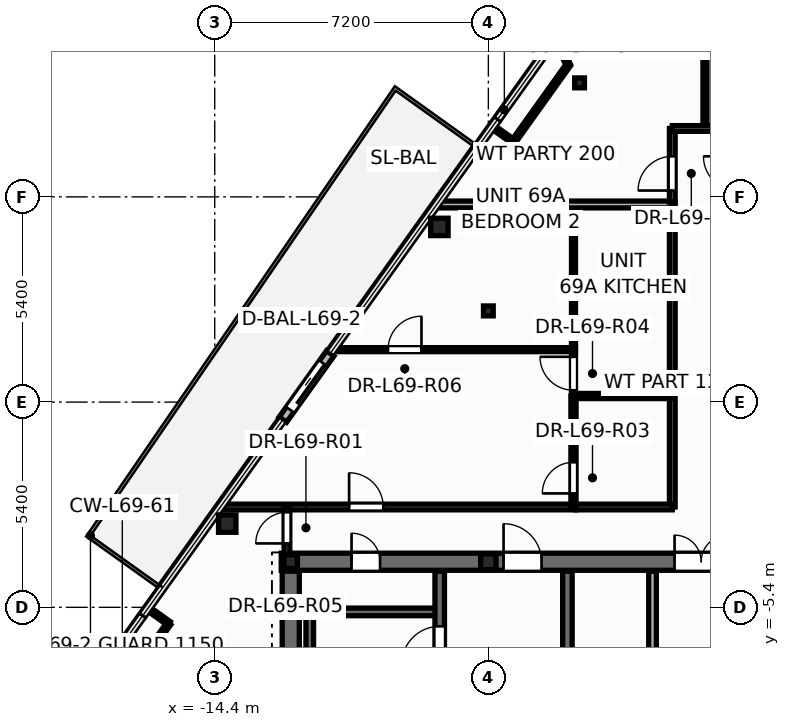
"""IFC4 building model, lengths in metres.
Left out: names, types, materials, properties, quantities, classifications, styles, units other than length and angle.
Written with IfcOpenShell. Run it as: python <this file> out.ifc"""

import sys

from ifc_helpers import new_model, si_unit, direction, frame, frame_2d, origin, origin_2d, place, context, subcontext, project, spatial, rectangle, hollow_circle, i_section, extrude, element, fill, save


model = new_model("IFC4")
c1 = context("Model", 3, precision=1e-05, world=origin(), true_north=direction((0.0, 1.0)))
c2 = subcontext(c1, "Body", "Model", "MODEL_VIEW")
j1 = project(units=[si_unit("LENGTHUNIT", "METRE"), si_unit("PLANEANGLEUNIT", "RADIAN")], contexts=[c1])
p1 = place(None, origin())
s1 = spatial("IfcSite", under=j1, at=p1, CompositionType="ELEMENT")
p2 = place(p1, origin())
s2 = spatial("IfcBuilding", under=s1, at=p2, CompositionType="ELEMENT")
p3 = place(p2, frame((0.0, 0.0, 263.4)))
s3 = spatial("IfcBuildingStorey", under=s2, at=p3, CompositionType="ELEMENT", Elevation=263.4)
for number, where, z_axis, x_axis in (
    (1, (-8.489, 4.61, 0.0), (0.0, 0.0, 1.0), (1.0, 0.0, 0.0)),
    (2, (-14.072, -3.196, 0.0), (0.0, 0.0, 1.0), (1.0, 0.0, 0.0)),
):
    element("IfcColumn", number, at=place(p3, frame(where, z_axis=z_axis, x_axis=x_axis)), inside=s3, PredefinedType="COLUMN", context=c2, shape_type="SweptSolid", body=[
        extrude(hollow_circle(Radius=0.229, WallThickness=0.016, at=origin_2d()), origin(), (0.0, 0.0, 1.0), 3.6),
    ])
p4 = place(p3, frame((-12.4, -4.2, 0.0), z_axis=(0.0, 0.0, 1.0), x_axis=(1.0, 0.0, 0.0)))
e3 = element("IfcColumn", 3, at=p4, inside=s3, PredefinedType="COLUMN", context=c2, shape_type="SweptSolid", body=[
    extrude(i_section(OverallWidth=0.352, OverallDepth=0.359, WebThickness=0.018, FlangeThickness=0.026, at=origin_2d()), origin(), (0.0, 0.0, 1.0), 3.6),
])
p5 = place(p3, frame((-7.2, -4.2, 0.0), z_axis=(0.0, 0.0, 1.0), x_axis=(1.0, 0.0, 0.0)))
e4 = element("IfcColumn", 4, at=p5, inside=s3, PredefinedType="PILASTER", context=c2, shape_type="SweptSolid", body=[
    extrude(i_section(OverallWidth=0.405, OverallDepth=0.414, WebThickness=0.022, FlangeThickness=0.032, at=origin_2d()), origin(), (0.0, 0.0, 1.0), 3.6),
])
for number, where, z_axis, x_axis in (
    (5, (-7.2, 2.4, 0.0), (0.0, 0.0, 1.0), (1.0, 0.0, 0.0)),
    (6, (-4.8, 8.4, 0.0), (0.0, 0.0, 1.0), (1.0, 0.0, 0.0)),
):
    element("IfcColumn", number, at=place(p3, frame(where, z_axis=z_axis, x_axis=x_axis)), inside=s3, PredefinedType="COLUMN", context=c2, shape_type="SweptSolid", body=[
        extrude(i_section(OverallWidth=0.256, OverallDepth=0.26, WebThickness=0.01, FlangeThickness=0.017, at=origin_2d()), origin(), (0.0, 0.0, 1.0), 3.6),
    ])
p6 = place(p3, frame((-11.361, 1.281, -0.015), z_axis=(0.0, 0.0, 1.0), x_axis=(-0.581702133873, -0.813401885569, 0.0)))
e7 = element("IfcWall", 7, at=p6, inside=s3, PredefinedType="STANDARD", context=c2, shape_type="SweptSolid", body=[
    extrude(rectangle(XDim=2.14, YDim=0.24, at=frame_2d((1.07, 0.0))), origin(), (0.0, 0.0, 1.0), 2.878),
])
p7 = place(p6, frame((0.32, 0.0, 0.015)))
e8 = element("IfcOpeningElement", 8, at=p7, cuts=e7, PredefinedType="OPENING", context=c2, shape_type="SweptSolid", body=[
    extrude(rectangle(XDim=1.506, YDim=2.204, at=frame_2d((0.75, 1.102))), frame((0.0, 0.13, 0.0), z_axis=(0.0, -1.0, 0.0), x_axis=(1.0, 0.0, 0.0)), (0.0, 0.0, 1.0), 0.26),
])
p8 = place(p3, frame((-12.65, -4.2, 0.0), z_axis=(0.0, 0.0, 1.0), x_axis=(1.0, 0.0, 0.0)))
e9 = element("IfcWall", 9, at=p8, inside=s3, PredefinedType="SHEAR", context=c2, shape_type="SweptSolid", body=[
    extrude(rectangle(XDim=25.3, YDim=0.45, at=frame_2d((12.65, 0.0))), origin(), (0.0, 0.0, 1.0), 3.6),
])
p9 = place(p8, frame((1.85, 0.0, 0.0)))
e10 = element("IfcOpeningElement", 10, at=p9, cuts=e9, PredefinedType="OPENING", context=c2, shape_type="SweptSolid", body=[
    extrude(rectangle(XDim=0.756, YDim=2.054, at=frame_2d((0.375, 1.027))), frame((0.0, 0.235, 0.0), z_axis=(0.0, -1.0, 0.0), x_axis=(1.0, 0.0, 0.0)), (0.0, 0.0, 1.0), 0.47),
])
p10 = place(p8, frame((22.65, 0.0, 0.0)))
e11 = element("IfcOpeningElement", 11, at=p10, cuts=e9, PredefinedType="OPENING", context=c2, shape_type="SweptSolid", body=[
    extrude(rectangle(XDim=0.756, YDim=2.054, at=frame_2d((0.375, 1.027))), frame((0.0, 0.235, 0.0), z_axis=(0.0, -1.0, 0.0), x_axis=(1.0, 0.0, 0.0)), (0.0, 0.0, 1.0), 0.47),
])
p11 = place(p8, frame((5.85, 0.0, 0.0)))
e12 = element("IfcOpeningElement", 12, at=p11, cuts=e9, PredefinedType="OPENING", context=c2, shape_type="SweptSolid", body=[
    extrude(rectangle(XDim=1.006, YDim=2.104, at=frame_2d((0.5, 1.052))), frame((0.0, 0.235, 0.0), z_axis=(0.0, -1.0, 0.0), x_axis=(1.0, 0.0, 0.0)), (0.0, 0.0, 1.0), 0.47),
])
p12 = place(p8, frame((10.35, 0.0, 0.0)))
e13 = element("IfcOpeningElement", 13, at=p12, cuts=e9, PredefinedType="OPENING", context=c2, shape_type="SweptSolid", body=[
    extrude(rectangle(XDim=1.406, YDim=2.154, at=frame_2d((0.7, 1.077))), frame((0.0, 0.235, 0.0), z_axis=(0.0, -1.0, 0.0), x_axis=(1.0, 0.0, 0.0)), (0.0, 0.0, 1.0), 0.47),
])
p13 = place(p8, frame((18.45, 0.0, 0.0)))
e14 = element("IfcOpeningElement", 14, at=p13, cuts=e9, PredefinedType="OPENING", context=c2, shape_type="SweptSolid", body=[
    extrude(rectangle(XDim=1.006, YDim=2.104, at=frame_2d((0.5, 1.052))), frame((0.0, 0.235, 0.0), z_axis=(0.0, -1.0, 0.0), x_axis=(1.0, 0.0, 0.0)), (0.0, 0.0, 1.0), 0.47),
])
p14 = place(p3, frame((-12.35, -5.52, 0.0), z_axis=(0.0, 0.0, 1.0), x_axis=(1.0, 0.0, 0.0)))
e15 = element("IfcWall", 15, at=p14, inside=s3, PredefinedType="SOLIDWALL", context=c2, shape_type="SweptSolid", body=[
    extrude(rectangle(XDim=3.87, YDim=0.2, at=frame_2d((1.935, 0.0))), origin(), (0.0, 0.0, 1.0), 3.6),
])
p15 = place(p3, frame((-11.9, -13.1, 0.0), z_axis=(0.0, 0.0, 1.0), x_axis=(0.0, 1.0, 0.0)))
e16 = element("IfcWall", 16, at=p15, inside=s3, PredefinedType="SOLIDWALL", context=c2, shape_type="SweptSolid", body=[
    extrude(rectangle(XDim=7.58, YDim=0.2, at=frame_2d((3.79, 0.0))), origin(), (0.0, 0.0, 1.0), 3.6),
])
p16 = place(p3, frame((-8.48, -13.85, 0.0), z_axis=(0.0, 0.0, 1.0), x_axis=(0.0, 1.0, 0.0)))
e17 = element("IfcWall", 17, at=p16, inside=s3, PredefinedType="SHEAR", context=c2, shape_type="SweptSolid", body=[
    extrude(rectangle(XDim=9.4, YDim=0.25, at=frame_2d((4.7, 0.0))), origin(), (0.0, 0.0, 1.0), 3.6),
])
p17 = place(p16, frame((6.95, 0.0, 0.0)))
e18 = element("IfcOpeningElement", 18, at=p17, cuts=e17, PredefinedType="OPENING", context=c2, shape_type="SweptSolid", body=[
    extrude(rectangle(XDim=1.006, YDim=2.104, at=frame_2d((0.5, 1.052))), frame((0.0, 0.135, 0.0), z_axis=(0.0, -1.0, 0.0), x_axis=(1.0, 0.0, 0.0)), (0.0, 0.0, 1.0), 0.27),
])
p18 = place(p3, frame((-5.12, -13.85, 0.0), z_axis=(0.0, 0.0, 1.0), x_axis=(0.0, 1.0, 0.0)))
e19 = element("IfcWall", 19, at=p18, inside=s3, PredefinedType="SHEAR", context=c2, shape_type="SweptSolid", body=[
    extrude(rectangle(XDim=9.4, YDim=0.25, at=frame_2d((4.7, 0.0))), origin(), (0.0, 0.0, 1.0), 3.6),
])
p19 = place(p3, frame((-12.4, -13.85, 0.0), z_axis=(0.0, 0.0, 1.0), x_axis=(0.0, 1.0, 0.0)))
e20 = element("IfcWall", 20, at=p19, inside=s3, PredefinedType="SHEAR", context=c2, shape_type="SweptSolid", body=[
    extrude(rectangle(XDim=9.4, YDim=0.45, at=frame_2d((4.7, 0.0))), origin(), (0.0, 0.0, 1.0), 3.6),
])
p20 = place(p3, frame((-2.88, -9.45, 0.0), z_axis=(0.0, 0.0, 1.0), x_axis=(0.0, 1.0, 0.0)))
e21 = element("IfcWall", 21, at=p20, inside=s3, PredefinedType="SOLIDWALL", context=c2, shape_type="SweptSolid", body=[
    extrude(rectangle(XDim=5.0, YDim=0.2, at=frame_2d((2.5, 0.0))), origin(), (0.0, 0.0, 1.0), 3.345),
])
p21 = place(p20, frame((2.05, 0.0, 0.0)))
e22 = element("IfcOpeningElement", 22, at=p21, cuts=e21, PredefinedType="OPENING", context=c2, shape_type="SweptSolid", body=[
    extrude(rectangle(XDim=0.926, YDim=2.104, at=frame_2d((0.46, 1.052))), frame((0.0, 0.11, 0.0), z_axis=(0.0, -1.0, 0.0), x_axis=(1.0, 0.0, 0.0)), (0.0, 0.0, 1.0), 0.22),
])
p22 = place(p3, frame((-14.251, -2.76, 0.0), z_axis=(0.0, 0.0, 1.0), x_axis=(1.0, 0.0, 0.0)))
e23 = element("IfcWall", 23, at=p22, inside=s3, PredefinedType="PARTITIONING", context=c2, shape_type="SweptSolid", body=[
    extrude(rectangle(XDim=9.351, YDim=0.15, at=frame_2d((4.676, 0.0))), origin(), (0.0, 0.0, 1.0), 2.32),
])
p23 = place(p22, frame((3.386, 0.0, 0.0)))
e24 = element("IfcOpeningElement", 24, at=p23, cuts=e23, PredefinedType="OPENING", context=c2, shape_type="SweptSolid", body=[
    extrude(rectangle(XDim=0.906, YDim=2.104, at=frame_2d((0.45, 1.052))), frame((0.0, 0.085, 0.0), z_axis=(0.0, -1.0, 0.0), x_axis=(1.0, 0.0, 0.0)), (0.0, 0.0, 1.0), 0.17),
])
p24 = place(p3, frame((-1.5, 7.2, 0.0), z_axis=(0.0, 0.0, 1.0), x_axis=(0.0, 1.0, 0.0)))
e25 = element("IfcWall", 25, at=p24, inside=s3, PredefinedType="PARTITIONING", context=c2, shape_type="SweptSolid", body=[
    extrude(rectangle(XDim=6.917, YDim=0.105, at=frame_2d((3.458, 0.0))), origin(), (0.0, 0.0, 1.0), 2.718),
])
p25 = place(p3, frame((-11.29, 1.38, 0.0), z_axis=(0.0, 0.0, 1.0), x_axis=(1.0, 0.0, 0.0)))
e26 = element("IfcWall", 26, at=p25, inside=s3, PredefinedType="PARTITIONING", context=c2, shape_type="SweptSolid", body=[
    extrude(rectangle(XDim=6.33, YDim=0.105, at=frame_2d((3.165, 0.0))), origin(), (0.0, 0.0, 1.0), 2.32),
])
p26 = place(p25, frame((1.45, 0.0, 0.0)))
e27 = element("IfcOpeningElement", 27, at=p26, cuts=e26, PredefinedType="OPENING", context=c2, shape_type="SweptSolid", body=[
    extrude(rectangle(XDim=0.886, YDim=2.104, at=frame_2d((0.44, 1.052))), frame((0.0, 0.062, 0.0), z_axis=(0.0, -1.0, 0.0), x_axis=(1.0, 0.0, 0.0)), (0.0, 0.0, 1.0), 0.125),
])
p27 = place(p3, frame((-2.36, -2.76, 0.0), z_axis=(0.0, 0.0, 1.0), x_axis=(0.0, 1.0, 0.0)))
e28 = element("IfcWall", 28, at=p27, inside=s3, PredefinedType="PARTITIONING", context=c2, shape_type="SweptSolid", body=[
    extrude(rectangle(XDim=8.02, YDim=0.15, at=frame_2d((4.01, 0.0))), origin(), (0.0, 0.0, 1.0), 2.32),
])
p28 = place(p3, frame((-4.96, 1.32, 0.0), z_axis=(0.0, 0.0, 1.0), x_axis=(0.0, 1.0, 0.0)))
e29 = element("IfcWall", 29, at=p28, inside=s3, PredefinedType="PARTITIONING", context=c2, shape_type="SweptSolid", body=[
    extrude(rectangle(XDim=3.88, YDim=0.105, at=frame_2d((1.94, 0.0))), origin(), (0.0, 0.0, 1.0), 2.32),
])
p29 = place(p3, frame((-8.558, 5.2, 0.0), z_axis=(0.0, 0.0, 1.0), x_axis=(1.0, 0.0, 0.0)))
e30 = element("IfcWall", 30, at=p29, inside=s3, PredefinedType="PARTITIONING", context=c2, shape_type="SweptSolid", body=[
    extrude(rectangle(XDim=6.198, YDim=0.18, at=frame_2d((3.099, 0.0))), origin(), (0.0, 0.0, 1.0), 2.718),
])
p30 = place(p3, frame((-4.96, -2.76, 0.0), z_axis=(0.0, 0.0, 1.0), x_axis=(0.0, 1.0, 0.0)))
e31 = element("IfcWall", 31, at=p30, inside=s3, PredefinedType="PARTITIONING", context=c2, shape_type="SweptSolid", body=[
    extrude(rectangle(XDim=2.92, YDim=0.135, at=frame_2d((1.46, 0.0))), origin(), (0.0, 0.0, 1.0), 3.345),
])
p31 = place(p30, frame((0.357, 0.0, 0.0)))
e32 = element("IfcOpeningElement", 32, at=p31, cuts=e31, PredefinedType="OPENING", context=c2, shape_type="SweptSolid", body=[
    extrude(rectangle(XDim=0.826, YDim=2.104, at=frame_2d((0.41, 1.052))), frame((0.0, 0.078, 0.0), z_axis=(0.0, -1.0, 0.0), x_axis=(1.0, 0.0, 0.0)), (0.0, 0.0, 1.0), 0.155),
])
p32 = place(p3, frame((-4.898, -2.76, 0.0), z_axis=(0.0, 0.0, 1.0), x_axis=(1.0, 0.0, 0.0)))
e33 = element("IfcWall", 33, at=p32, inside=s3, PredefinedType="PARTITIONING", context=c2, shape_type="SweptSolid", body=[
    extrude(rectangle(XDim=2.538, YDim=0.15, at=frame_2d((1.269, 0.0))), origin(), (0.0, 0.0, 1.0), 2.965),
])
p33 = place(p3, frame((-4.96, 0.16, 0.0), z_axis=(0.0, 0.0, 1.0), x_axis=(1.0, 0.0, 0.0)))
e34 = element("IfcWall", 34, at=p33, inside=s3, PredefinedType="PARTITIONING", context=c2, shape_type="SweptSolid", body=[
    extrude(rectangle(XDim=2.6, YDim=0.135, at=frame_2d((1.3, 0.0))), origin(), (0.0, 0.0, 1.0), 2.965),
])
p34 = place(p3, frame((-5.097, 8.87, 0.0), z_axis=(0.0, 0.0, 1.0), x_axis=(-0.581685079242, -0.813414081872, 0.0)))
e35 = element("IfcWall", 35, at=p34, inside=s3, PredefinedType="PARTITIONING", context=c2, shape_type="SweptSolid", body=[
    extrude(rectangle(XDim=2.48, YDim=0.12, at=frame_2d((1.24, 0.0))), origin(), (0.0, 0.0, 1.0), 2.718),
])
p35 = place(p3, frame((-15.606, -5.824, 0.0), z_axis=(0.0, 0.0, 1.0), x_axis=(-0.581685079242, -0.813414081872, 0.0)))
e36 = element("IfcWall", 36, at=p35, inside=s3, PredefinedType="PARTITIONING", context=c2, shape_type="SweptSolid", body=[
    extrude(rectangle(XDim=2.48, YDim=0.12, at=frame_2d((1.24, 0.0))), origin(), (0.0, 0.0, 1.0), 3.345),
])
p36 = place(p3, frame((-2.36, 5.262, 0.0), z_axis=(0.0, 0.0, 1.0), x_axis=(0.0, 1.0, 0.0)))
e37 = element("IfcWall", 37, at=p36, inside=s3, PredefinedType="PARTITIONING", context=c2, shape_type="SweptSolid", body=[
    extrude(rectangle(XDim=1.938, YDim=0.15, at=frame_2d((0.969, 0.0))), origin(), (0.0, 0.0, 1.0), 2.965),
])
p37 = place(p36, frame((0.305, 0.0, 0.0)))
e38 = element("IfcOpeningElement", 38, at=p37, cuts=e37, PredefinedType="OPENING", context=c2, shape_type="SweptSolid", body=[
    extrude(rectangle(XDim=0.906, YDim=2.104, at=frame_2d((0.45, 1.052))), frame((0.0, 0.085, 0.0), z_axis=(0.0, -1.0, 0.0), x_axis=(1.0, 0.0, 0.0)), (0.0, 0.0, 1.0), 0.17),
])
p38 = place(p3, frame((-12.5, -4.24, 0.0), z_axis=(0.0, 0.0, 1.0), x_axis=(0.0, 1.0, 0.0)))
e39 = element("IfcWall", 39, at=p38, inside=s3, PredefinedType="PARTITIONING", context=c2, shape_type="SweptSolid", body=[
    extrude(rectangle(XDim=1.48, YDim=0.15, at=frame_2d((0.74, 0.0))), origin(), (0.0, 0.0, 1.0), 2.32),
])
p39 = place(p38, frame((0.522, 0.0, 0.0)))
e40 = element("IfcOpeningElement", 40, at=p39, cuts=e39, PredefinedType="OPENING", context=c2, shape_type="SweptSolid", body=[
    extrude(rectangle(XDim=0.826, YDim=2.104, at=frame_2d((0.41, 1.052))), frame((0.0, 0.085, 0.0), z_axis=(0.0, -1.0, 0.0), x_axis=(1.0, 0.0, 0.0)), (0.0, 0.0, 1.0), 0.17),
])
p40 = place(p3, frame((-4.96, 0.16, 0.0), z_axis=(0.0, 0.0, 1.0), x_axis=(0.0, 1.0, 0.0)))
e41 = element("IfcWall", 41, at=p40, inside=s3, PredefinedType="PARTITIONING", context=c2, shape_type="SweptSolid", body=[
    extrude(rectangle(XDim=1.28, YDim=0.105, at=frame_2d((0.64, 0.0))), origin(), (0.0, 0.0, 1.0), 3.345),
])
p41 = place(p40, frame((0.152, 0.0, 0.0)))
e42 = element("IfcOpeningElement", 42, at=p41, cuts=e41, PredefinedType="OPENING", context=c2, shape_type="SweptSolid", body=[
    extrude(rectangle(XDim=0.886, YDim=2.104, at=frame_2d((0.44, 1.052))), frame((0.0, 0.062, 0.0), z_axis=(0.0, -1.0, 0.0), x_axis=(1.0, 0.0, 0.0)), (0.0, 0.0, 1.0), 0.125),
])
p42 = place(p3, frame((-2.36, 7.2, 0.0), z_axis=(0.0, 0.0, 1.0), x_axis=(1.0, 0.0, 0.0)))
e43 = element("IfcWall", 43, at=p42, inside=s3, PredefinedType="PARTITIONING", context=c2, shape_type="SweptSolid", body=[
    extrude(rectangle(XDim=1.72, YDim=0.15, at=frame_2d((0.86, 0.0))), origin(), (0.0, 0.0, 1.0), 2.965),
])
p43 = place(p3, frame((-5.411, 9.583, 0.0), z_axis=(0.0, 0.0, 1.0), x_axis=(0.402675604016, -0.915342754344, 0.0)))
e44 = element("IfcWall", 44, at=p43, inside=s3, PredefinedType="PARTITIONING", context=c2, shape_type="SweptSolid", body=[
    extrude(rectangle(XDim=0.779, YDim=0.12, at=frame_2d((0.39, 0.0))), origin(), (0.0, 0.0, 1.0), 2.863),
])
p44 = place(p3, frame((-6.54, 6.853, 0.0), z_axis=(0.0, 0.0, 1.0), x_axis=(-0.813388759568, 0.581720487698, 0.0)))
e45 = element("IfcWall", 45, at=p44, inside=s3, PredefinedType="PARTITIONING", context=c2, shape_type="SweptSolid", body=[
    extrude(rectangle(XDim=0.67, YDim=0.12, at=frame_2d((0.335, 0.0))), origin(), (0.0, 0.0, 1.0), 2.863),
])
p45 = place(p3, frame((-16.151, -5.434, 0.0), z_axis=(0.0, 0.0, 1.0), x_axis=(0.813265440227, -0.581892879947, 0.0)))
e46 = element("IfcWall", 46, at=p45, inside=s3, PredefinedType="PARTITIONING", context=c2, shape_type="SweptSolid", body=[
    extrude(rectangle(XDim=0.67, YDim=0.12, at=frame_2d((0.335, 0.0))), origin(), (0.0, 0.0, 1.0), 2.863),
])
p46 = place(p7, origin())
e47 = element("IfcDoor", 47, at=p46, inside=s3, OperationType="SLIDING_TO_RIGHT", PredefinedType="DOOR", context=c2, shape_type="SweptSolid", body=[
    extrude(rectangle(XDim=1.5, YDim=2.2, at=frame_2d((0.75, 1.1))), frame((0.0, 0.025, 0.0), z_axis=(0.0, -1.0, 0.0), x_axis=(1.0, 0.0, 0.0)), (0.0, 0.0, 1.0), 0.05),
])
fill(e8, e47)
p47 = place(p17, origin())
e48 = element("IfcDoor", 48, at=p47, inside=s3, OperationType="SINGLE_SWING_LEFT", PredefinedType="DOOR", context=c2, shape_type="SweptSolid", body=[
    extrude(rectangle(XDim=1.0, YDim=2.1, at=frame_2d((0.5, 1.05))), frame((0.0, 0.025, 0.0), z_axis=(0.0, -1.0, 0.0), x_axis=(1.0, 0.0, 0.0)), (0.0, 0.0, 1.0), 0.05),
])
fill(e18, e48)
p48 = place(p9, origin())
e49 = element("IfcDoor", 49, at=p48, inside=s3, OperationType="SINGLE_SWING_LEFT", PredefinedType="DOOR", context=c2, shape_type="SweptSolid", body=[
    extrude(rectangle(XDim=0.75, YDim=2.05, at=frame_2d((0.375, 1.025))), frame((0.0, 0.025, 0.0), z_axis=(0.0, -1.0, 0.0), x_axis=(1.0, 0.0, 0.0)), (0.0, 0.0, 1.0), 0.05),
])
fill(e10, e49)
p49 = place(p11, origin())
e50 = element("IfcDoor", 50, at=p49, inside=s3, OperationType="SINGLE_SWING_LEFT", PredefinedType="DOOR", context=c2, shape_type="SweptSolid", body=[
    extrude(rectangle(XDim=1.0, YDim=2.1, at=frame_2d((0.5, 1.05))), frame((0.0, 0.025, 0.0), z_axis=(0.0, -1.0, 0.0), x_axis=(1.0, 0.0, 0.0)), (0.0, 0.0, 1.0), 0.05),
])
fill(e12, e50)
p50 = place(p12, origin())
e51 = element("IfcDoor", 51, at=p50, inside=s3, OperationType="DOUBLE_DOOR_SINGLE_SWING", PredefinedType="DOOR", context=c2, shape_type="SweptSolid", body=[
    extrude(rectangle(XDim=1.4, YDim=2.15, at=frame_2d((0.7, 1.075))), frame((0.0, 0.025, 0.0), z_axis=(0.0, -1.0, 0.0), x_axis=(1.0, 0.0, 0.0)), (0.0, 0.0, 1.0), 0.05),
])
fill(e13, e51)
p51 = place(p39, origin())
e52 = element("IfcDoor", 52, at=p51, inside=s3, OperationType="SINGLE_SWING_LEFT", PredefinedType="DOOR", context=c2, shape_type="SweptSolid", body=[
    extrude(rectangle(XDim=0.82, YDim=2.1, at=frame_2d((0.41, 1.05))), frame((0.0, 0.025, 0.0), z_axis=(0.0, -1.0, 0.0), x_axis=(1.0, 0.0, 0.0)), (0.0, 0.0, 1.0), 0.05),
])
fill(e40, e52)
p52 = place(p31, origin())
e53 = element("IfcDoor", 53, at=p52, inside=s3, OperationType="SINGLE_SWING_LEFT", PredefinedType="DOOR", context=c2, shape_type="SweptSolid", body=[
    extrude(rectangle(XDim=0.82, YDim=2.1, at=frame_2d((0.41, 1.05))), frame((0.0, 0.025, 0.0), z_axis=(0.0, -1.0, 0.0), x_axis=(1.0, 0.0, 0.0)), (0.0, 0.0, 1.0), 0.05),
])
fill(e32, e53)
p53 = place(p41, origin())
e54 = element("IfcDoor", 54, at=p53, inside=s3, OperationType="SINGLE_SWING_RIGHT", PredefinedType="DOOR", context=c2, shape_type="SweptSolid", body=[
    extrude(rectangle(XDim=0.88, YDim=2.1, at=frame_2d((0.44, 1.05))), frame((0.0, 0.025, 0.0), z_axis=(0.0, -1.0, 0.0), x_axis=(1.0, 0.0, 0.0)), (0.0, 0.0, 1.0), 0.05),
])
fill(e42, e54)
p54 = place(p23, origin())
e55 = element("IfcDoor", 55, at=p54, inside=s3, OperationType="SINGLE_SWING_LEFT", PredefinedType="DOOR", context=c2, shape_type="SweptSolid", body=[
    extrude(rectangle(XDim=0.9, YDim=2.1, at=frame_2d((0.45, 1.05))), frame((0.0, 0.025, 0.0), z_axis=(0.0, -1.0, 0.0), x_axis=(1.0, 0.0, 0.0)), (0.0, 0.0, 1.0), 0.05),
])
fill(e24, e55)
p55 = place(p26, origin())
e56 = element("IfcDoor", 56, at=p55, inside=s3, OperationType="SINGLE_SWING_RIGHT", PredefinedType="DOOR", context=c2, shape_type="SweptSolid", body=[
    extrude(rectangle(XDim=0.88, YDim=2.1, at=frame_2d((0.44, 1.05))), frame((0.0, 0.025, 0.0), z_axis=(0.0, -1.0, 0.0), x_axis=(1.0, 0.0, 0.0)), (0.0, 0.0, 1.0), 0.05),
])
fill(e27, e56)
p56 = place(p37, origin())
e57 = element("IfcDoor", 57, at=p56, inside=s3, OperationType="SINGLE_SWING_LEFT", PredefinedType="DOOR", context=c2, shape_type="SweptSolid", body=[
    extrude(rectangle(XDim=0.9, YDim=2.1, at=frame_2d((0.45, 1.05))), frame((0.0, 0.025, 0.0), z_axis=(0.0, -1.0, 0.0), x_axis=(1.0, 0.0, 0.0)), (0.0, 0.0, 1.0), 0.05),
])
fill(e38, e57)
save(model, sys.argv[1])
